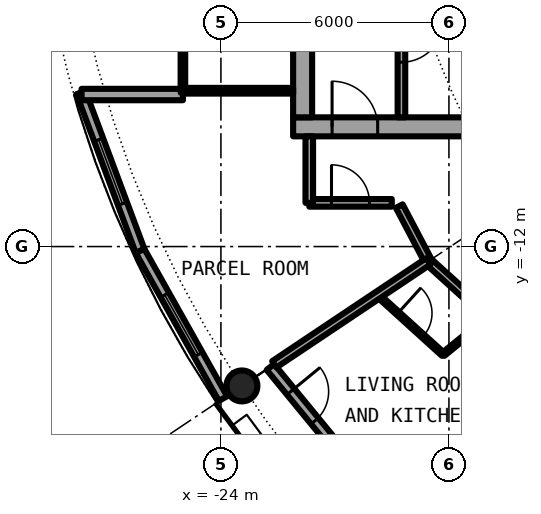
"""IFC4 building model, lengths in metres.
Left out: names, types, materials, properties, quantities, classifications, styles, units other than length and angle.
Written with IfcOpenShell. Run it as: python <this file> out.ifc"""

import sys

from ifc_helpers import new_model, si_unit, direction, frame, frame_2d, origin, origin_2d, place, context, subcontext, project, spatial, rectangle, hollow_circle, extrude, element, fill, save


model = new_model("IFC4")
c1 = context("Model", 3, precision=1e-05, world=origin(), true_north=direction((0.0, 1.0)))
c2 = subcontext(c1, "Body", "Model", "MODEL_VIEW")
j1 = project(units=[si_unit("LENGTHUNIT", "METRE"), si_unit("PLANEANGLEUNIT", "RADIAN")], contexts=[c1])
p1 = place(None, origin())
s1 = spatial("IfcSite", under=j1, at=p1, CompositionType="ELEMENT")
p2 = place(p1, origin())
s2 = spatial("IfcBuilding", under=s1, at=p2, CompositionType="ELEMENT")
p3 = place(p2, frame((0.0, 0.0, 173.8)))
s3 = spatial("IfcBuildingStorey", under=s2, at=p3, CompositionType="ELEMENT", Elevation=173.8)
p4 = place(p3, frame((-23.448, -15.667, 0.0), z_axis=(0.0, 0.0, 1.0), x_axis=(1.0, 0.0, 0.0)))
e1 = element("IfcColumn", 1, at=p4, inside=s3, PredefinedType="COLUMN", context=c2, shape_type="SweptSolid", body=[
    extrude(hollow_circle(Radius=0.406, WallThickness=0.04, at=origin_2d()), origin(), (0.0, 0.0, 1.0), 3.05),
])
p5 = place(p3, frame((-22.699, -15.167, 0.0), z_axis=(0.0, 0.0, 1.0), x_axis=(0.634382322723, -0.773019449054, 0.0)))
e2 = element("IfcWall", 2, at=p5, inside=s3, PredefinedType="SOLIDWALL", context=c2, shape_type="SweptSolid", body=[
    extrude(rectangle(XDim=5.352, YDim=0.25, at=frame_2d((2.676, 0.0))), origin(), (0.0, 0.0, 1.0), 2.7),
])
p6 = place(p5, frame((0.841, 0.0, 0.0)))
e3 = element("IfcOpeningElement", 3, at=p6, cuts=e2, PredefinedType="OPENING", context=c2, shape_type="SweptSolid", body=[
    extrude(rectangle(XDim=1.0, YDim=2.2, at=frame_2d((0.5, 1.1))), frame((0.0, 0.135, 0.0), z_axis=(0.0, -1.0, 0.0), x_axis=(1.0, 0.0, 0.0)), (0.0, 0.0, 1.0), 0.27),
])
p7 = place(p5, frame((3.111, 0.0, 0.3)))
e4 = element("IfcOpeningElement", 4, at=p7, cuts=e2, PredefinedType="OPENING", context=c2, shape_type="SweptSolid", body=[
    extrude(rectangle(XDim=1.8, YDim=2.1, at=frame_2d((0.9, 1.05))), frame((0.0, 0.135, 0.0), z_axis=(0.0, -1.0, 0.0), x_axis=(1.0, 0.0, 0.0)), (0.0, 0.0, 1.0), 0.27),
])
p8 = place(p3, frame((-27.682, -7.945, 0.0), z_axis=(0.0, 0.0, 1.0), x_axis=(0.349247811493, -0.937030397675, 0.0)))
e5 = element("IfcWall", 5, at=p8, inside=s3, PredefinedType="SOLIDWALL", context=c2, shape_type="SweptSolid", body=[
    extrude(rectangle(XDim=4.452, YDim=0.25, at=frame_2d((2.226, 0.0))), origin(), (0.0, 0.0, 1.0), 2.7),
])
p9 = place(p8, frame((1.327, 0.0, 0.3)))
e6 = element("IfcOpeningElement", 6, at=p9, cuts=e5, PredefinedType="OPENING", context=c2, shape_type="SweptSolid", body=[
    extrude(rectangle(XDim=1.8, YDim=2.1, at=frame_2d((0.9, 1.05))), frame((0.0, 0.135, 0.0), z_axis=(0.0, -1.0, 0.0), x_axis=(1.0, 0.0, 0.0)), (0.0, 0.0, 1.0), 0.27),
])
p10 = place(p3, frame((-26.127, -12.117, 0.0), z_axis=(0.0, 0.0, 1.0), x_axis=(0.489696356642, -0.871893042919, 0.0)))
e7 = element("IfcWall", 7, at=p10, inside=s3, PredefinedType="SOLIDWALL", context=c2, shape_type="SweptSolid", body=[
    extrude(rectangle(XDim=4.454, YDim=0.25, at=frame_2d((2.227, 0.0))), origin(), (0.0, 0.0, 1.0), 2.7),
])
p11 = place(p10, frame((1.327, 0.0, 0.3)))
e8 = element("IfcOpeningElement", 8, at=p11, cuts=e7, PredefinedType="OPENING", context=c2, shape_type="SweptSolid", body=[
    extrude(rectangle(XDim=1.8, YDim=2.1, at=frame_2d((0.9, 1.05))), frame((0.0, 0.135, 0.0), z_axis=(0.0, -1.0, 0.0), x_axis=(1.0, 0.0, 0.0)), (0.0, 0.0, 1.0), 0.27),
])
p12 = place(p3, frame((-25.0, -8.0, 0.0), z_axis=(0.0, 0.0, 1.0), x_axis=(-1.0, 0.0, 0.0)))
e9 = element("IfcWall", 9, at=p12, inside=s3, PredefinedType="SOLIDWALL", context=c2, shape_type="SweptSolid", body=[
    extrude(rectangle(XDim=2.667, YDim=0.3, at=frame_2d((1.333, 0.0))), origin(), (0.0, 0.0, 1.0), 2.7),
])
p13 = place(p3, frame((-22.1, -8.85, 0.0), z_axis=(0.0, 0.0, 1.0), x_axis=(1.0, 0.0, 0.0)))
e10 = element("IfcWall", 10, at=p13, inside=s3, PredefinedType="SHEAR", context=c2, shape_type="SweptSolid", body=[
    extrude(rectangle(XDim=13.6, YDim=0.5, at=frame_2d((6.8, 0.0))), origin(), (0.0, 0.0, 1.0), 3.05),
])
p14 = place(p13, frame((1.025, 0.0, 0.0)))
e11 = element("IfcOpeningElement", 11, at=p14, cuts=e10, PredefinedType="OPENING", context=c2, shape_type="SweptSolid", body=[
    extrude(rectangle(XDim=1.2, YDim=2.3, at=frame_2d((0.6, 1.15))), frame((0.0, 0.26, 0.0), z_axis=(0.0, -1.0, 0.0), x_axis=(1.0, 0.0, 0.0)), (0.0, 0.0, 1.0), 0.52),
])
p15 = place(p3, frame((-21.85, -8.6, 0.0), z_axis=(0.0, 0.0, 1.0), x_axis=(0.0, 1.0, 0.0)))
e12 = element("IfcWall", 12, at=p15, inside=s3, PredefinedType="SHEAR", context=c2, shape_type="SweptSolid", body=[
    extrude(rectangle(XDim=17.2, YDim=0.5, at=frame_2d((8.6, 0.0))), origin(), (0.0, 0.0, 1.0), 3.05),
])
p16 = place(p15, frame((7.7, 0.0, 0.0)))
e13 = element("IfcOpeningElement", 13, at=p16, cuts=e12, PredefinedType="OPENING", context=c2, shape_type="SweptSolid", body=[
    extrude(rectangle(XDim=1.8, YDim=2.3, at=frame_2d((0.9, 1.15))), frame((0.0, 0.26, 0.0), z_axis=(0.0, -1.0, 0.0), x_axis=(1.0, 0.0, 0.0)), (0.0, 0.0, 1.0), 0.52),
])
p17 = place(p3, frame((-19.25, -1.575, 0.0), z_axis=(0.0, 0.0, 1.0), x_axis=(0.0, -1.0, 0.0)))
e14 = element("IfcWall", 14, at=p17, inside=s3, PredefinedType="SOLIDWALL", context=c2, shape_type="SweptSolid", body=[
    extrude(rectangle(XDim=7.025, YDim=0.2, at=frame_2d((3.513, 0.0))), origin(), (0.0, 0.0, 1.0), 2.7),
])
p18 = place(p17, frame((4.475, 0.0, 0.0)))
e15 = element("IfcOpeningElement", 15, at=p18, cuts=e14, PredefinedType="OPENING", context=c2, shape_type="SweptSolid", body=[
    extrude(rectangle(XDim=1.1, YDim=2.3, at=frame_2d((0.55, 1.15))), frame((0.0, 0.11, 0.0), z_axis=(0.0, -1.0, 0.0), x_axis=(1.0, 0.0, 0.0)), (0.0, 0.0, 1.0), 0.22),
])
p19 = place(p3, frame((-22.1, -7.9, 0.0), z_axis=(0.0, 0.0, 1.0), x_axis=(-1.0, 0.0, 0.0)))
e16 = element("IfcWall", 16, at=p19, inside=s3, PredefinedType="PARTITIONING", context=c2, shape_type="SweptSolid", body=[
    extrude(rectangle(XDim=2.84, YDim=0.15, at=frame_2d((1.42, 0.0))), origin(), (0.0, 0.0, 1.0), 2.7),
])
p20 = place(p3, frame((-25.0, 7.95, 0.0), z_axis=(0.0, 0.0, 1.0), x_axis=(0.0, -1.0, 0.0)))
e17 = element("IfcWall", 17, at=p20, inside=s3, PredefinedType="PARTITIONING", context=c2, shape_type="SweptSolid", body=[
    extrude(rectangle(XDim=15.9, YDim=0.12, at=frame_2d((7.95, 0.0))), origin(), (0.0, 0.0, 1.0), 2.7),
])
p21 = place(p20, frame((0.95, 0.0, 0.1)))
e18 = element("IfcOpeningElement", 18, at=p21, cuts=e17, PredefinedType="OPENING", context=c2, shape_type="SweptSolid", body=[
    extrude(rectangle(XDim=14.0, YDim=2.35, at=frame_2d((7.0, 1.175))), frame((0.0, 0.07, 0.0), z_axis=(0.0, -1.0, 0.0), x_axis=(1.0, 0.0, 0.0)), (0.0, 0.0, 1.0), 0.14),
])
p22 = place(p3, frame((-19.872, -13.278, 0.0), z_axis=(0.0, 0.0, 1.0), x_axis=(0.740990220108, -0.671515817911, 0.0)))
e19 = element("IfcWall", 19, at=p22, inside=s3, PredefinedType="PARTITIONING", context=c2, shape_type="SweptSolid", body=[
    extrude(rectangle(XDim=2.323, YDim=0.1, at=frame_2d((1.161, 0.0))), origin(), (0.0, 0.0, 1.0), 2.7),
])
p23 = place(p22, frame((0.711, 0.0, 0.0)))
e20 = element("IfcOpeningElement", 20, at=p23, cuts=e19, PredefinedType="OPENING", context=c2, shape_type="SweptSolid", body=[
    extrude(rectangle(XDim=0.9, YDim=2.3, at=frame_2d((0.45, 1.15))), frame((0.0, 0.06, 0.0), z_axis=(0.0, -1.0, 0.0), x_axis=(1.0, 0.0, 0.0)), (0.0, 0.0, 1.0), 0.12),
])
p24 = place(p3, frame((-19.307, -10.935, 0.0), z_axis=(0.0, 0.0, 1.0), x_axis=(0.465605550524, -0.884992356646, 0.0)))
e21 = element("IfcWall", 21, at=p24, inside=s3, PredefinedType="PARTITIONING", context=c2, shape_type="SweptSolid", body=[
    extrude(rectangle(XDim=1.643, YDim=0.2, at=frame_2d((0.821, 0.0))), origin(), (0.0, 0.0, 1.0), 2.7),
])
p25 = place(p3, frame((-18.542, -12.389, 0.0), z_axis=(0.0, 0.0, 1.0), x_axis=(0.740947367223, -0.671563101283, 0.0)))
e22 = element("IfcWall", 22, at=p25, inside=s3, PredefinedType="PARTITIONING", context=c2, shape_type="SweptSolid", body=[
    extrude(rectangle(XDim=10.837, YDim=0.2, at=frame_2d((5.419, 0.0))), origin(), (0.0, 0.0, 1.0), 2.7),
])
p26 = place(p25, frame((6.002, 0.0, 0.0)))
e23 = element("IfcOpeningElement", 23, at=p26, cuts=e22, PredefinedType="OPENING", context=c2, shape_type="SweptSolid", body=[
    extrude(rectangle(XDim=1.0, YDim=2.3, at=frame_2d((0.5, 1.15))), frame((0.0, 0.11, 0.0), z_axis=(0.0, -1.0, 0.0), x_axis=(1.0, 0.0, 0.0)), (0.0, 0.0, 1.0), 0.22),
])
p27 = place(p3, frame((-21.675, -10.85, 0.0), z_axis=(0.0, 0.0, 1.0), x_axis=(1.0, 0.0, 0.0)))
e24 = element("IfcWall", 24, at=p27, inside=s3, PredefinedType="PARTITIONING", context=c2, shape_type="SweptSolid", body=[
    extrude(rectangle(XDim=2.171, YDim=0.2, at=frame_2d((1.085, 0.0))), origin(), (0.0, 0.0, 1.0), 2.7),
])
p28 = place(p27, frame((0.585, 0.0, 0.0)))
e25 = element("IfcOpeningElement", 25, at=p28, cuts=e24, PredefinedType="OPENING", context=c2, shape_type="SweptSolid", body=[
    extrude(rectangle(XDim=1.0, YDim=2.3, at=frame_2d((0.5, 1.15))), frame((0.0, 0.11, 0.0), z_axis=(0.0, -1.0, 0.0), x_axis=(1.0, 0.0, 0.0)), (0.0, 0.0, 1.0), 0.22),
])
p29 = place(p3, frame((-22.595, -15.098, 0.0), z_axis=(0.0, 0.0, 1.0), x_axis=(0.831387096605, 0.55569370664, 0.0)))
e26 = element("IfcWall", 26, at=p29, inside=s3, PredefinedType="PARTITIONING", context=c2, shape_type="SweptSolid", body=[
    extrude(rectangle(XDim=4.875, YDim=0.2, at=frame_2d((2.438, 0.0))), origin(), (0.0, 0.0, 1.0), 2.7),
])
p30 = place(p3, frame((-19.234, -19.197, 0.0), z_axis=(0.0, 0.0, 1.0), x_axis=(0.707722727509, 0.706490297858, 0.0)))
e27 = element("IfcWall", 27, at=p30, inside=s3, PredefinedType="PARTITIONING", context=c2, shape_type="SweptSolid", body=[
    extrude(rectangle(XDim=3.962, YDim=0.1, at=frame_2d((1.981, 0.0))), origin(), (0.0, 0.0, 1.0), 2.7),
])
p31 = place(p30, frame((1.531, 0.0, 0.0)))
e28 = element("IfcOpeningElement", 28, at=p31, cuts=e27, PredefinedType="OPENING", context=c2, shape_type="SweptSolid", body=[
    extrude(rectangle(XDim=0.9, YDim=2.3, at=frame_2d((0.45, 1.15))), frame((0.0, 0.06, 0.0), z_axis=(0.0, -1.0, 0.0), x_axis=(1.0, 0.0, 0.0)), (0.0, 0.0, 1.0), 0.12),
])
p32 = place(p3, frame((-18.151, -14.838, 0.0), z_axis=(0.0, 0.0, 1.0), x_axis=(0.774283039722, 0.632839453889, 0.0)))
e29 = element("IfcWall", 29, at=p32, inside=s3, PredefinedType="PARTITIONING", context=c2, shape_type="SweptSolid", body=[
    extrude(rectangle(XDim=1.569, YDim=0.1, at=frame_2d((0.785, 0.0))), origin(), (0.0, 0.0, 1.0), 2.7),
])
p33 = place(p3, frame((-21.675, -10.85, 0.0), z_axis=(0.0, 0.0, 1.0), x_axis=(0.0, 1.0, 0.0)))
e30 = element("IfcWall", 30, at=p33, inside=s3, PredefinedType="PARTITIONING", context=c2, shape_type="SweptSolid", body=[
    extrude(rectangle(XDim=1.75, YDim=0.2, at=frame_2d((0.875, 0.0))), origin(), (0.0, 0.0, 1.0), 2.7),
])
p34 = place(p6, origin())
e31 = element("IfcDoor", 31, at=p34, inside=s3, OperationType="SINGLE_SWING_LEFT", PredefinedType="DOOR", context=c2, shape_type="SweptSolid", body=[
    extrude(rectangle(XDim=1.0, YDim=2.2, at=frame_2d((0.5, 1.1))), frame((0.0, 0.025, 0.0), z_axis=(0.0, -1.0, 0.0), x_axis=(1.0, 0.0, 0.0)), (0.0, 0.0, 1.0), 0.05),
])
fill(e3, e31)
p35 = place(p9, origin())
e32 = element("IfcWindow", 32, at=p35, inside=s3, PartitioningType="SINGLE_PANEL", PredefinedType="WINDOW", context=c2, shape_type="SweptSolid", body=[
    extrude(rectangle(XDim=1.8, YDim=2.1, at=frame_2d((0.9, 1.05))), frame((0.0, 0.03, 0.0), z_axis=(0.0, -1.0, 0.0), x_axis=(1.0, 0.0, 0.0)), (0.0, 0.0, 1.0), 0.06),
])
fill(e6, e32)
p36 = place(p11, origin())
e33 = element("IfcWindow", 33, at=p36, inside=s3, PartitioningType="SINGLE_PANEL", PredefinedType="WINDOW", context=c2, shape_type="SweptSolid", body=[
    extrude(rectangle(XDim=1.8, YDim=2.1, at=frame_2d((0.9, 1.05))), frame((0.0, 0.03, 0.0), z_axis=(0.0, -1.0, 0.0), x_axis=(1.0, 0.0, 0.0)), (0.0, 0.0, 1.0), 0.06),
])
fill(e8, e33)
p37 = place(p18, origin())
e34 = element("IfcDoor", 34, at=p37, inside=s3, OperationType="SINGLE_SWING_LEFT", PredefinedType="DOOR", context=c2, shape_type="SweptSolid", body=[
    extrude(rectangle(XDim=1.1, YDim=2.3, at=frame_2d((0.55, 1.15))), frame((0.0, 0.025, 0.0), z_axis=(0.0, -1.0, 0.0), x_axis=(1.0, 0.0, 0.0)), (0.0, 0.0, 1.0), 0.05),
])
fill(e15, e34)
p38 = place(p14, origin())
e35 = element("IfcDoor", 35, at=p38, inside=s3, OperationType="SINGLE_SWING_RIGHT", PredefinedType="DOOR", context=c2, shape_type="SweptSolid", body=[
    extrude(rectangle(XDim=1.2, YDim=2.3, at=frame_2d((0.6, 1.15))), frame((0.0, 0.025, 0.0), z_axis=(0.0, -1.0, 0.0), x_axis=(1.0, 0.0, 0.0)), (0.0, 0.0, 1.0), 0.05),
])
fill(e11, e35)
p39 = place(p21, origin())
e36 = element("IfcWindow", 36, at=p39, inside=s3, PartitioningType="SINGLE_PANEL", PredefinedType="WINDOW", context=c2, shape_type="SweptSolid", body=[
    extrude(rectangle(XDim=14.0, YDim=2.35, at=frame_2d((7.0, 1.175))), frame((0.0, 0.03, 0.0), z_axis=(0.0, -1.0, 0.0), x_axis=(1.0, 0.0, 0.0)), (0.0, 0.0, 1.0), 0.06),
])
fill(e18, e36)
p40 = place(p23, origin())
e37 = element("IfcDoor", 37, at=p40, inside=s3, OperationType="SINGLE_SWING_RIGHT", PredefinedType="DOOR", context=c2, shape_type="SweptSolid", body=[
    extrude(rectangle(XDim=0.9, YDim=2.3, at=frame_2d((0.45, 1.15))), frame((0.0, 0.025, 0.0), z_axis=(0.0, -1.0, 0.0), x_axis=(1.0, 0.0, 0.0)), (0.0, 0.0, 1.0), 0.05),
])
fill(e20, e37)
p41 = place(p28, origin())
e38 = element("IfcDoor", 38, at=p41, inside=s3, OperationType="SINGLE_SWING_LEFT", PredefinedType="DOOR", context=c2, shape_type="SweptSolid", body=[
    extrude(rectangle(XDim=1.0, YDim=2.3, at=frame_2d((0.5, 1.15))), frame((0.0, 0.025, 0.0), z_axis=(0.0, -1.0, 0.0), x_axis=(1.0, 0.0, 0.0)), (0.0, 0.0, 1.0), 0.05),
])
fill(e25, e38)
save(model, sys.argv[1])
